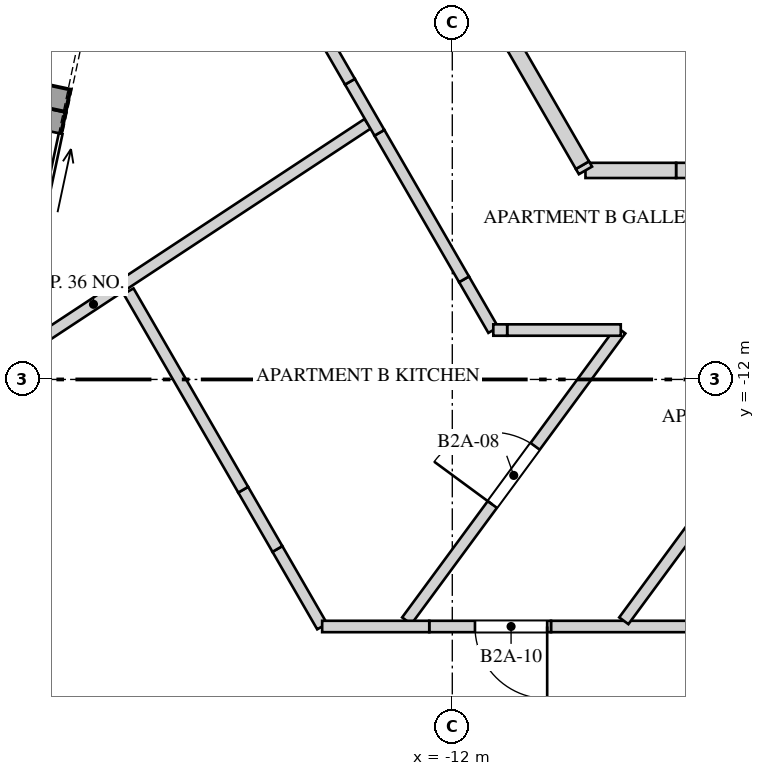
"""IFC4 building model, lengths in metres.
Left out: names, types, materials, properties, quantities, classifications, styles, units other than length and angle.
Written with IfcOpenShell. Run it as: python <this file> out.ifc"""

import sys

from ifc_helpers import new_model, si_unit, direction, frame, frame_2d, origin, place, context, subcontext, project, spatial, polyline, rectangle, outline, extrude, element, fill, save


model = new_model("IFC4")
c1 = context("Model", 3, precision=1e-05, world=origin(), true_north=direction((0.0, 1.0)))
c2 = subcontext(c1, "Body", "Model", "MODEL_VIEW")
j1 = project(units=[si_unit("LENGTHUNIT", "METRE"), si_unit("PLANEANGLEUNIT", "RADIAN")], contexts=[c1])
p1 = place(None, origin())
s1 = spatial("IfcSite", under=j1, at=p1, CompositionType="ELEMENT")
p2 = place(p1, origin())
s2 = spatial("IfcBuilding", under=s1, at=p2, CompositionType="ELEMENT")
p3 = place(p2, frame((0.0, 0.0, 88.4)))
s3 = spatial("IfcBuildingStorey", under=s2, at=p3, CompositionType="ELEMENT", Elevation=88.4)
p4 = place(p3, frame((-17.233, -8.449, 0.0), z_axis=(0.0, 0.0, 1.0), x_axis=(-0.207866417042, -0.978157222877, 0.0)))
e1 = element("IfcWall", 1, at=p4, inside=s3, PredefinedType="SOLIDWALL", context=c2, shape_type="SweptSolid", body=[
    extrude(rectangle(XDim=2.287, YDim=0.3, at=frame_2d((1.144, 0.0))), origin(), (0.0, 0.0, 1.0), 3.3),
])
p5 = place(p4, frame((0.293, 0.0, 0.0)))
e2 = element("IfcOpeningElement", 2, at=p5, cuts=e1, PredefinedType="OPENING", context=c2, shape_type="SweptSolid", body=[
    extrude(rectangle(XDim=1.7, YDim=2.4, at=frame_2d((0.85, 1.2))), frame((0.0, 0.16, 0.0), z_axis=(0.0, -1.0, 0.0), x_axis=(1.0, 0.0, 0.0)), (0.0, 0.0, 1.0), 0.32),
])
p6 = place(p3, frame((-20.039, -7.699, 0.0), z_axis=(0.0, 0.0, 1.0), x_axis=(0.978154782045, -0.207877902534, 0.0)))
e3 = element("IfcWall", 3, at=p6, inside=s3, PredefinedType="SOLIDWALL", context=c2, shape_type="SweptSolid", body=[
    extrude(rectangle(XDim=3.05, YDim=0.3, at=frame_2d((1.525, 0.0))), origin(), (0.0, 0.0, 1.0), 3.3),
])
p7 = place(p3, frame((-20.327, -13.387, 0.0), z_axis=(0.0, 0.0, 1.0), x_axis=(0.835168014777, 0.549994897334, 0.0)))
e4 = element("IfcWall", 4, at=p7, inside=s3, PredefinedType="PARTITIONING", context=c2, shape_type="SweptSolid", body=[
    extrude(rectangle(XDim=8.637, YDim=0.15, at=frame_2d((4.319, 0.0))), origin(), (0.0, 0.0, 1.0), 2.75),
])
p8 = place(p3, frame((-13.712, -15.25, 0.0), z_axis=(0.0, 0.0, 1.0), x_axis=(-0.499907924584, 0.866078557025, 0.0)))
e5 = element("IfcWall", 5, at=p8, inside=s3, PredefinedType="PARTITIONING", context=c2, shape_type="SweptSolid", body=[
    extrude(rectangle(XDim=1.177, YDim=0.15, at=frame_2d((0.589, 0.0))), origin(), (0.0, 0.0, 1.0), 3.65),
])
p9 = place(p3, frame((-14.301, -14.23, 0.0), z_axis=(0.0, 0.0, 1.0), x_axis=(-0.499988457423, 0.866032067792, 0.0)))
e6 = element("IfcWall", 6, at=p9, inside=s3, PredefinedType="PARTITIONING", context=c2, shape_type="SweptSolid", body=[
    extrude(rectangle(XDim=0.9, YDim=0.15, at=frame_2d((0.45, 0.0))), origin(), (0.0, 0.0, 1.0), 2.55),
])
p10 = place(p3, frame((-14.751, -13.45, 0.0), z_axis=(0.0, 0.0, 1.0), x_axis=(-0.499979445284, 0.86603727073, 0.0)))
e7 = element("IfcWall", 7, at=p10, inside=s3, PredefinedType="PARTITIONING", context=c2, shape_type="SweptSolid", body=[
    extrude(rectangle(XDim=3.015, YDim=0.15, at=frame_2d((1.508, 0.0))), origin(), (0.0, 0.0, 1.0), 3.65),
])
p11 = place(p3, frame((-12.599, -15.175, 0.0), z_axis=(0.0, 0.0, 1.0), x_axis=(0.592829004129, 0.805328362758, 0.0)))
e8 = element("IfcWall", 8, at=p11, inside=s3, PredefinedType="PARTITIONING", context=c2, shape_type="SweptSolid", body=[
    extrude(rectangle(XDim=4.75, YDim=0.15, at=frame_2d((2.375, 0.0))), origin(), (0.0, 0.0, 1.0), 3.65),
])
p12 = place(p11, frame((1.9, 0.0, 0.0)))
e9 = element("IfcOpeningElement", 9, at=p12, cuts=e8, PredefinedType="OPENING", context=c2, shape_type="SweptSolid", body=[
    extrude(rectangle(XDim=0.95, YDim=2.4, at=frame_2d((0.475, 1.2))), frame((0.0, 0.085, 0.0), z_axis=(0.0, -1.0, 0.0), x_axis=(1.0, 0.0, 0.0)), (0.0, 0.0, 1.0), 0.17),
])
p13 = place(p3, frame((-11.46, -11.35, 0.0), z_axis=(0.0, 0.0, 1.0), x_axis=(-0.49974986996, 0.866169768276, 0.0)))
e10 = element("IfcWall", 10, at=p13, inside=s3, PredefinedType="PARTITIONING", context=c2, shape_type="SweptSolid", body=[
    extrude(rectangle(XDim=0.771, YDim=0.15, at=frame_2d((0.385, 0.0))), origin(), (0.0, 0.0, 1.0), 2.55),
])
p14 = place(p3, frame((-11.846, -10.682, 0.0), z_axis=(0.0, 0.0, 1.0), x_axis=(-0.500067425712, 0.865986472032, 0.0)))
e11 = element("IfcWall", 11, at=p14, inside=s3, PredefinedType="PARTITIONING", context=c2, shape_type="SweptSolid", body=[
    extrude(rectangle(XDim=2.226, YDim=0.15, at=frame_2d((1.113, 0.0))), origin(), (0.0, 0.0, 1.0), 3.65),
])
p15 = place(p3, frame((-12.959, -8.755, 0.0), z_axis=(0.0, 0.0, 1.0), x_axis=(-0.500031167255, 0.866007408613, 0.0)))
e12 = element("IfcWall", 12, at=p15, inside=s3, PredefinedType="PARTITIONING", context=c2, shape_type="SweptSolid", body=[
    extrude(rectangle(XDim=0.776, YDim=0.15, at=frame_2d((0.388, 0.0))), origin(), (0.0, 0.0, 1.0), 2.75),
])
p16 = place(p3, frame((-13.347, -8.083, 0.0), z_axis=(0.0, 0.0, 1.0), x_axis=(-0.499983483481, 0.866034939391, 0.0)))
e13 = element("IfcWall", 13, at=p16, inside=s3, PredefinedType="PARTITIONING", context=c2, shape_type="SweptSolid", body=[
    extrude(rectangle(XDim=4.426, YDim=0.15, at=frame_2d((2.213, 0.0))), origin(), (0.0, 0.0, 1.0), 3.65),
])
p17 = place(p3, frame((-9.784, -11.35, 0.0), z_axis=(0.0, 0.0, 1.0), x_axis=(-1.0, 0.0, 0.0)))
e14 = element("IfcWall", 14, at=p17, inside=s3, PredefinedType="PARTITIONING", context=c2, shape_type="SweptSolid", body=[
    extrude(rectangle(XDim=1.494, YDim=0.15, at=frame_2d((0.747, 0.0))), origin(), (0.0, 0.0, 1.0), 3.65),
])
p18 = place(p3, frame((-11.278, -11.35, 0.0), z_axis=(0.0, 0.0, 1.0), x_axis=(-1.0, 0.0, 0.0)))
e15 = element("IfcWall", 15, at=p18, inside=s3, PredefinedType="PARTITIONING", context=c2, shape_type="SweptSolid", body=[
    extrude(rectangle(XDim=0.182, YDim=0.15, at=frame_2d((0.091, 0.0))), origin(), (0.0, 0.0, 1.0), 2.55),
])
p19 = place(p3, frame((-8.134, -15.25, 0.0), z_axis=(0.0, 0.0, 1.0), x_axis=(-1.0, 0.0, 0.0)))
e16 = element("IfcWall", 16, at=p19, inside=s3, PredefinedType="PARTITIONING", context=c2, shape_type="SweptSolid", body=[
    extrude(rectangle(XDim=2.568, YDim=0.15, at=frame_2d((1.284, 0.0))), origin(), (0.0, 0.0, 1.0), 3.65),
])
p20 = place(p3, frame((-10.702, -15.25, 0.0), z_axis=(0.0, 0.0, 1.0), x_axis=(-1.0, 0.0, 0.0)))
e17 = element("IfcWall", 17, at=p20, inside=s3, PredefinedType="PARTITIONING", context=c2, shape_type="SweptSolid", body=[
    extrude(outline(polyline([(0.0, 0.0), (1.601, 0.0), (1.601, 2.55), (0.497, 2.55), (0.497, 3.65), (0.0, 3.65), (0.0, 0.0)])), frame((0.0, 0.075, 0.0), z_axis=(0.0, -1.0, 0.0), x_axis=(1.0, 0.0, 0.0)), (0.0, 0.0, 1.0), 0.15),
])
p21 = place(p20, frame((0.05, 0.0, 0.0)))
e18 = element("IfcOpeningElement", 18, at=p21, cuts=e17, PredefinedType="OPENING", context=c2, shape_type="SweptSolid", body=[
    extrude(rectangle(XDim=0.95, YDim=2.4, at=frame_2d((0.475, 1.2))), frame((0.0, 0.085, 0.0), z_axis=(0.0, -1.0, 0.0), x_axis=(1.0, 0.0, 0.0)), (0.0, 0.0, 1.0), 0.17),
])
p22 = place(p3, frame((-12.303, -15.25, 0.0), z_axis=(0.0, 0.0, 1.0), x_axis=(-1.0, 0.0, 0.0)))
e19 = element("IfcWall", 19, at=p22, inside=s3, PredefinedType="PARTITIONING", context=c2, shape_type="SweptSolid", body=[
    extrude(rectangle(XDim=1.409, YDim=0.15, at=frame_2d((0.705, 0.0))), origin(), (0.0, 0.0, 1.0), 3.65),
])
p23 = place(p3, frame((-6.927, -11.35, 0.0), z_axis=(0.0, 0.0, 1.0), x_axis=(-0.592862340114, -0.805303821967, 0.0)))
e20 = element("IfcWall", 20, at=p23, inside=s3, PredefinedType="PARTITIONING", context=c2, shape_type="SweptSolid", body=[
    extrude(rectangle(XDim=4.75, YDim=0.15, at=frame_2d((2.375, 0.0))), origin(), (0.0, 0.0, 1.0), 3.65),
])
p24 = place(p23, frame((1.95, 0.0, 0.0)))
e21 = element("IfcOpeningElement", 21, at=p24, cuts=e20, PredefinedType="OPENING", context=c2, shape_type="SweptSolid", body=[
    extrude(rectangle(XDim=0.85, YDim=2.4, at=frame_2d((0.425, 1.2))), frame((0.0, 0.085, 0.0), z_axis=(0.0, -1.0, 0.0), x_axis=(1.0, 0.0, 0.0)), (0.0, 0.0, 1.0), 0.17),
])
p25 = place(p3, frame((-5.914, -11.425, 0.0), z_axis=(0.0, 0.0, 1.0), x_axis=(-0.45968915988, -0.888079881705, 0.0)))
e22 = element("IfcWall", 22, at=p25, inside=s3, PredefinedType="PARTITIONING", context=c2, shape_type="SweptSolid", body=[
    extrude(rectangle(XDim=11.474, YDim=0.15, at=frame_2d((5.737, 0.0))), origin(), (0.0, 0.0, 1.0), 2.55),
])
p26 = place(p3, frame((-7.696, -9.25, 0.0), z_axis=(0.0, 0.0, 1.0), x_axis=(-1.0, 0.0, 0.0)))
e23 = element("IfcWall", 23, at=p26, inside=s3, PredefinedType="SOLIDWALL", context=c2, shape_type="SweptSolid", body=[
    extrude(rectangle(XDim=1.36, YDim=0.2, at=frame_2d((0.68, 0.0))), origin(), (0.0, 0.0, 1.0), 3.65),
])
p27 = place(p3, frame((-9.056, -9.25, 0.0), z_axis=(0.0, 0.0, 1.0), x_axis=(-1.0, 0.0, 0.0)))
e24 = element("IfcWall", 24, at=p27, inside=s3, PredefinedType="SOLIDWALL", context=c2, shape_type="SweptSolid", body=[
    extrude(rectangle(XDim=1.192, YDim=0.2, at=frame_2d((0.596, 0.0))), origin(), (0.0, 0.0, 1.0), 2.55),
])
p28 = place(p3, frame((-10.248, -9.25, 0.0), z_axis=(0.0, 0.0, 1.0), x_axis=(-0.499103811596, 0.866542200502, 0.0)))
e25 = element("IfcWall", 25, at=p28, inside=s3, PredefinedType="SOLIDWALL", context=c2, shape_type="SweptSolid", body=[
    extrude(rectangle(XDim=0.08, YDim=0.2, at=frame_2d((0.04, 0.0))), origin(), (0.0, 0.0, 1.0), 2.55),
])
p29 = place(p3, frame((-10.288, -9.181, 0.0), z_axis=(0.0, 0.0, 1.0), x_axis=(-0.499986405537, 0.866033252409, 0.0)))
e26 = element("IfcWall", 26, at=p29, inside=s3, PredefinedType="SOLIDWALL", context=c2, shape_type="SweptSolid", body=[
    extrude(rectangle(XDim=1.788, YDim=0.2, at=frame_2d((0.894, 0.0))), origin(), (0.0, 0.0, 1.0), 3.65),
])
p30 = place(p12, origin())
e27 = element("IfcDoor", 27, at=p30, inside=s3, OperationType="SINGLE_SWING_RIGHT", PredefinedType="DOOR", context=c2, shape_type="SweptSolid", body=[
    extrude(rectangle(XDim=0.95, YDim=2.4, at=frame_2d((0.475, 1.2))), frame((0.0, 0.025, 0.0), z_axis=(0.0, -1.0, 0.0), x_axis=(1.0, 0.0, 0.0)), (0.0, 0.0, 1.0), 0.05),
])
fill(e9, e27)
p31 = place(p21, origin())
e28 = element("IfcDoor", 28, at=p31, inside=s3, OperationType="SINGLE_SWING_RIGHT", PredefinedType="DOOR", context=c2, shape_type="SweptSolid", body=[
    extrude(rectangle(XDim=0.95, YDim=2.4, at=frame_2d((0.475, 1.2))), frame((0.0, 0.025, 0.0), z_axis=(0.0, -1.0, 0.0), x_axis=(1.0, 0.0, 0.0)), (0.0, 0.0, 1.0), 0.05),
])
fill(e18, e28)
save(model, sys.argv[1])
